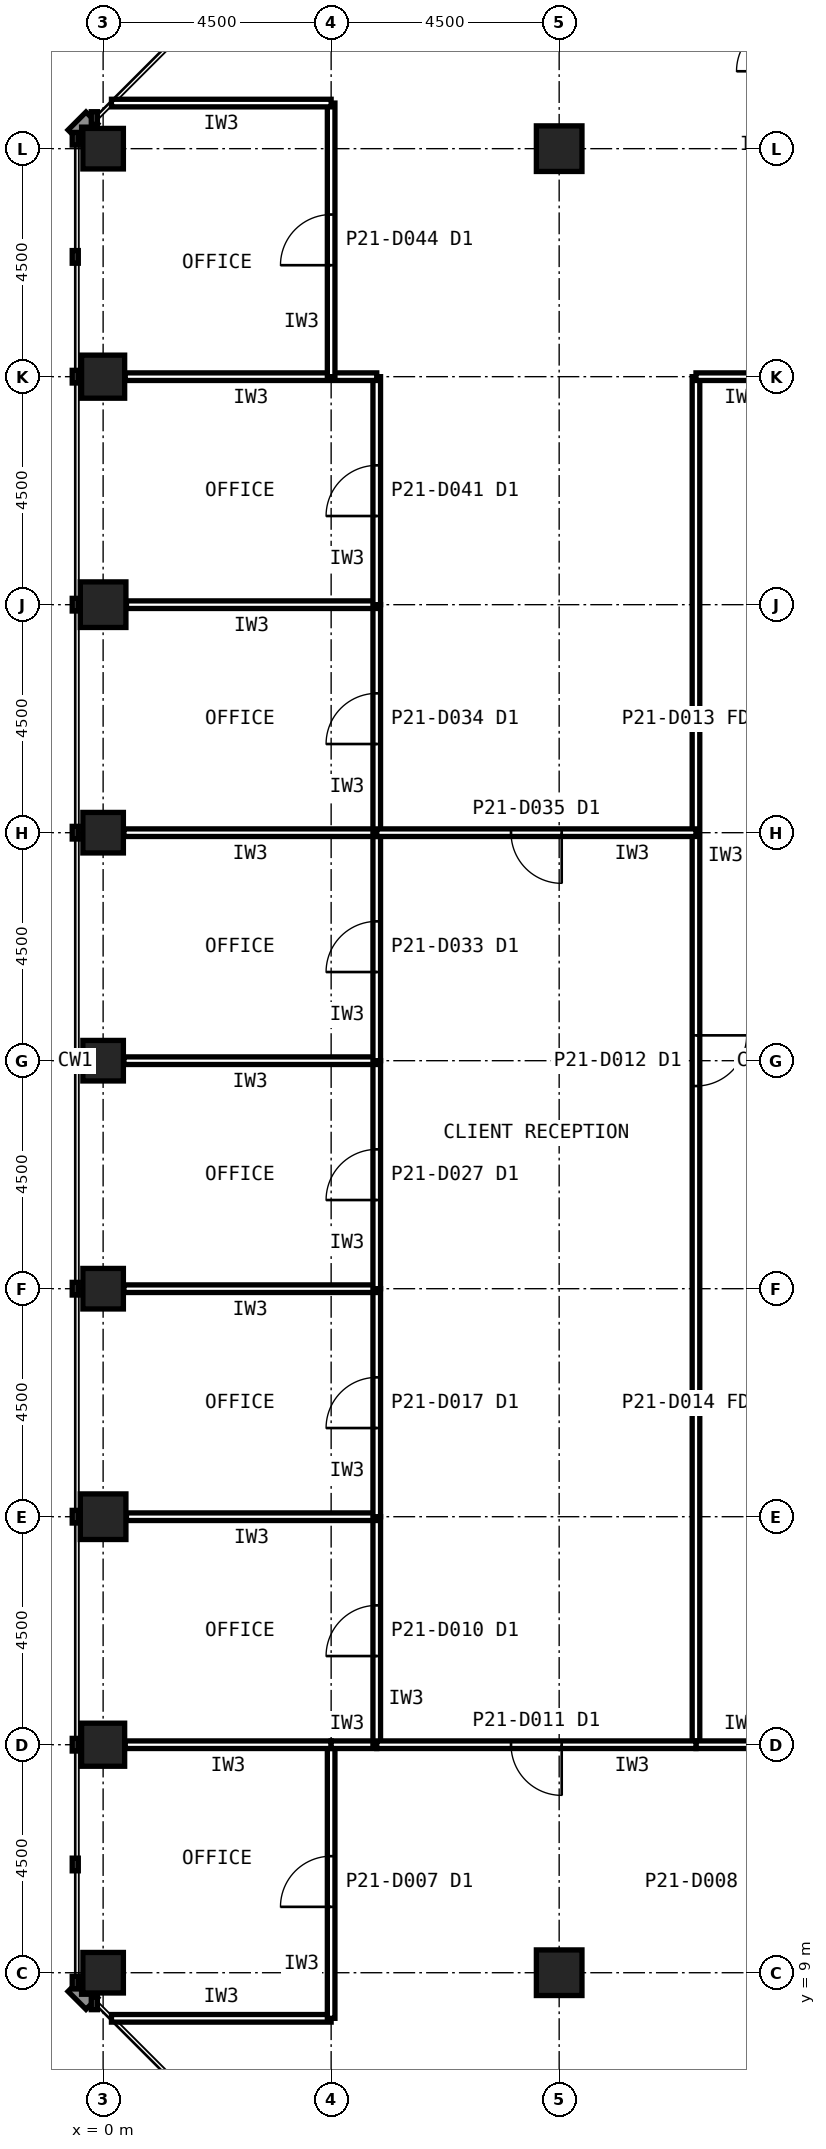
"""IFC4 building model, lengths in metres.
Left out: names, types, materials, properties, quantities, classifications, styles, units other than length and angle.
Written with IfcOpenShell. Run it as: python <this file> out.ifc"""

import sys

from ifc_helpers import new_model, si_unit, direction, frame, frame_2d, origin, origin_2d, place, context, subcontext, project, spatial, rectangle, hollow_rectangle, extrude, element, fill, save


model = new_model("IFC4")
c1 = context("Model", 3, precision=1e-05, world=origin(), true_north=direction((0.0, 1.0)))
c2 = subcontext(c1, "Body", "Model", "MODEL_VIEW")
j1 = project(units=[si_unit("LENGTHUNIT", "METRE"), si_unit("PLANEANGLEUNIT", "RADIAN")], contexts=[c1])
p1 = place(None, origin())
s1 = spatial("IfcSite", under=j1, at=p1, CompositionType="ELEMENT")
p2 = place(p1, origin())
s2 = spatial("IfcBuilding", under=s1, at=p2, CompositionType="ELEMENT")
p3 = place(p2, frame((0.0, 0.0, 87.8)))
s3 = spatial("IfcBuildingStorey", under=s2, at=p3, CompositionType="ELEMENT", Elevation=87.8)
p4 = place(p3, frame((0.0, 45.0, 0.0), z_axis=(0.0, 0.0, 1.0), x_axis=(1.0, 0.0, 0.0)))
e1 = element("IfcColumn", 1, at=p4, inside=s3, PredefinedType="COLUMN", context=c2, shape_type="SweptSolid", body=[
    extrude(hollow_rectangle(XDim=0.8, YDim=0.8, WallThickness=0.045, at=origin_2d()), origin(), (0.0, 0.0, 1.0), 4.2),
])
p5 = place(p3, frame((0.0, 40.5, 0.0), z_axis=(0.0, 0.0, 1.0), x_axis=(1.0, 0.0, 0.0)))
e2 = element("IfcColumn", 2, at=p5, inside=s3, PredefinedType="COLUMN", context=c2, shape_type="SweptSolid", body=[
    extrude(hollow_rectangle(XDim=0.85, YDim=0.85, WallThickness=0.05, at=origin_2d()), origin(), (0.0, 0.0, 1.0), 4.2),
])
p6 = place(p3, frame((0.0, 36.0, 0.0), z_axis=(0.0, 0.0, 1.0), x_axis=(1.0, 0.0, 0.0)))
e3 = element("IfcColumn", 3, at=p6, inside=s3, PredefinedType="COLUMN", context=c2, shape_type="SweptSolid", body=[
    extrude(hollow_rectangle(XDim=0.9, YDim=0.9, WallThickness=0.063, at=origin_2d()), origin(), (0.0, 0.0, 1.0), 4.2),
])
for number, where, z_axis, x_axis in (
    (4, (0.0, 31.5, 0.0), (0.0, 0.0, 1.0), (1.0, 0.0, 0.0)),
    (5, (0.0, 27.0, 0.0), (0.0, 0.0, 1.0), (1.0, 0.0, 0.0)),
    (6, (0.0, 22.5, 0.0), (0.0, 0.0, 1.0), (1.0, 0.0, 0.0)),
):
    element("IfcColumn", number, at=place(p3, frame(where, z_axis=z_axis, x_axis=x_axis)), inside=s3, PredefinedType="COLUMN", context=c2, shape_type="SweptSolid", body=[
        extrude(hollow_rectangle(XDim=0.8, YDim=0.8, WallThickness=0.045, at=origin_2d()), origin(), (0.0, 0.0, 1.0), 4.2),
    ])
p7 = place(p3, frame((0.0, 18.0, 0.0), z_axis=(0.0, 0.0, 1.0), x_axis=(1.0, 0.0, 0.0)))
e7 = element("IfcColumn", 7, at=p7, inside=s3, PredefinedType="COLUMN", context=c2, shape_type="SweptSolid", body=[
    extrude(hollow_rectangle(XDim=0.9, YDim=0.9, WallThickness=0.063, at=origin_2d()), origin(), (0.0, 0.0, 1.0), 4.2),
])
p8 = place(p3, frame((0.0, 13.5, 0.0), z_axis=(0.0, 0.0, 1.0), x_axis=(1.0, 0.0, 0.0)))
e8 = element("IfcColumn", 8, at=p8, inside=s3, PredefinedType="COLUMN", context=c2, shape_type="SweptSolid", body=[
    extrude(hollow_rectangle(XDim=0.85, YDim=0.85, WallThickness=0.05, at=origin_2d()), origin(), (0.0, 0.0, 1.0), 4.2),
])
p9 = place(p3, frame((0.0, 9.0, 0.0), z_axis=(0.0, 0.0, 1.0), x_axis=(1.0, 0.0, 0.0)))
e9 = element("IfcColumn", 9, at=p9, inside=s3, PredefinedType="COLUMN", context=c2, shape_type="SweptSolid", body=[
    extrude(hollow_rectangle(XDim=0.8, YDim=0.8, WallThickness=0.045, at=origin_2d()), origin(), (0.0, 0.0, 1.0), 4.2),
])
for number, where, z_axis, x_axis in (
    (10, (9.0, 9.0, 0.0), (0.0, 0.0, 1.0), (1.0, 0.0, 0.0)),
    (11, (9.0, 45.0, 0.0), (0.0, 0.0, 1.0), (1.0, 0.0, 0.0)),
):
    element("IfcColumn", number, at=place(p3, frame(where, z_axis=z_axis, x_axis=x_axis)), inside=s3, PredefinedType="COLUMN", context=c2, shape_type="SweptSolid", body=[
        extrude(hollow_rectangle(XDim=0.9, YDim=0.9, WallThickness=0.063, at=origin_2d()), origin(), (0.0, 0.0, 1.0), 4.2),
    ])
p10 = place(p3, frame((11.7, 40.5, 0.0), z_axis=(0.0, 0.0, 1.0), x_axis=(0.0, -1.0, 0.0)))
e12 = element("IfcWall", 12, at=p10, inside=s3, PredefinedType="PARTITIONING", context=c2, shape_type="SweptSolid", body=[
    extrude(rectangle(XDim=27.0, YDim=0.15, at=frame_2d((13.5, 0.0))), origin(), (0.0, 0.0, 1.0), 4.04),
])
p11 = place(p10, frame((13.0, 0.0, 0.0)))
e13 = element("IfcOpeningElement", 13, at=p11, cuts=e12, PredefinedType="OPENING", context=c2, shape_type="SweptSolid", body=[
    extrude(rectangle(XDim=1.0, YDim=2.1, at=frame_2d((0.5, 1.05))), frame((0.0, 0.085, 0.0), z_axis=(0.0, -1.0, 0.0), x_axis=(1.0, 0.0, 0.0)), (0.0, 0.0, 1.0), 0.17),
])
p12 = place(p3, frame((13.51, 40.5, 0.0), z_axis=(0.0, 0.0, 1.0), x_axis=(-1.0, 0.0, 0.0)))
e14 = element("IfcWall", 14, at=p12, inside=s3, PredefinedType="PARTITIONING", context=c2, shape_type="SweptSolid", body=[
    extrude(rectangle(XDim=1.81, YDim=0.15, at=frame_2d((0.905, 0.0))), origin(), (0.0, 0.0, 1.0), 3.189),
])
p13 = place(p3, frame((11.7, 13.5, 0.0), z_axis=(0.0, 0.0, 1.0), x_axis=(1.0, 0.0, 0.0)))
e15 = element("IfcWall", 15, at=p13, inside=s3, PredefinedType="PARTITIONING", context=c2, shape_type="SweptSolid", body=[
    extrude(rectangle(XDim=1.8, YDim=0.15, at=frame_2d((0.9, 0.0))), origin(), (0.0, 0.0, 1.0), 3.189),
])
p14 = place(p3, frame((0.165, 8.1, 0.0), z_axis=(0.0, 0.0, 1.0), x_axis=(1.0, 0.0, 0.0)))
e16 = element("IfcWall", 16, at=p14, inside=s3, PredefinedType="PARTITIONING", context=c2, shape_type="SweptSolid", body=[
    extrude(rectangle(XDim=4.335, YDim=0.15, at=frame_2d((2.168, 0.0))), origin(), (0.0, 0.0, 1.0), 4.04),
])
p15 = place(p3, frame((4.5, 8.1, 0.0), z_axis=(0.0, 0.0, 1.0), x_axis=(0.0, 1.0, 0.0)))
e17 = element("IfcWall", 17, at=p15, inside=s3, PredefinedType="PARTITIONING", context=c2, shape_type="SweptSolid", body=[
    extrude(rectangle(XDim=5.4, YDim=0.15, at=frame_2d((2.7, 0.0))), origin(), (0.0, 0.0, 1.0), 4.04),
])
p16 = place(p15, frame((2.2, 0.0, 0.0)))
e18 = element("IfcOpeningElement", 18, at=p16, cuts=e17, PredefinedType="OPENING", context=c2, shape_type="SweptSolid", body=[
    extrude(rectangle(XDim=1.0, YDim=2.1, at=frame_2d((0.5, 1.05))), frame((0.0, 0.085, 0.0), z_axis=(0.0, -1.0, 0.0), x_axis=(1.0, 0.0, 0.0)), (0.0, 0.0, 1.0), 0.17),
])
p17 = place(p3, frame((4.5, 13.5, 0.0), z_axis=(0.0, 0.0, 1.0), x_axis=(-1.0, 0.0, 0.0)))
e19 = element("IfcWall", 19, at=p17, inside=s3, PredefinedType="PARTITIONING", context=c2, shape_type="SweptSolid", body=[
    extrude(rectangle(XDim=4.065, YDim=0.15, at=frame_2d((2.032, 0.0))), origin(), (0.0, 0.0, 1.0), 3.189),
])
p18 = place(p3, frame((4.5, 13.5, 0.0), z_axis=(0.0, 0.0, 1.0), x_axis=(1.0, 0.0, 0.0)))
e20 = element("IfcWall", 20, at=p18, inside=s3, PredefinedType="PARTITIONING", context=c2, shape_type="SweptSolid", body=[
    extrude(rectangle(XDim=0.9, YDim=0.15, at=frame_2d((0.45, 0.0))), origin(), (0.0, 0.0, 1.0), 3.189),
])
p19 = place(p3, frame((5.4, 13.5, 0.0), z_axis=(0.0, 0.0, 1.0), x_axis=(0.0, 1.0, 0.0)))
e21 = element("IfcWall", 21, at=p19, inside=s3, PredefinedType="PARTITIONING", context=c2, shape_type="SweptSolid", body=[
    extrude(rectangle(XDim=4.5, YDim=0.15, at=frame_2d((2.25, 0.0))), origin(), (0.0, 0.0, 1.0), 4.04),
])
p20 = place(p19, frame((1.75, 0.0, 0.0)))
e22 = element("IfcOpeningElement", 22, at=p20, cuts=e21, PredefinedType="OPENING", context=c2, shape_type="SweptSolid", body=[
    extrude(rectangle(XDim=1.0, YDim=2.1, at=frame_2d((0.5, 1.05))), frame((0.0, 0.085, 0.0), z_axis=(0.0, -1.0, 0.0), x_axis=(1.0, 0.0, 0.0)), (0.0, 0.0, 1.0), 0.17),
])
p21 = place(p3, frame((5.4, 18.0, 0.0), z_axis=(0.0, 0.0, 1.0), x_axis=(-1.0, 0.0, 0.0)))
e23 = element("IfcWall", 23, at=p21, inside=s3, PredefinedType="PARTITIONING", context=c2, shape_type="SweptSolid", body=[
    extrude(rectangle(XDim=4.94, YDim=0.15, at=frame_2d((2.47, 0.0))), origin(), (0.0, 0.0, 1.0), 3.189),
])
p22 = place(p3, frame((5.4, 18.0, 0.0), z_axis=(0.0, 0.0, 1.0), x_axis=(0.0, 1.0, 0.0)))
e24 = element("IfcWall", 24, at=p22, inside=s3, PredefinedType="PARTITIONING", context=c2, shape_type="SweptSolid", body=[
    extrude(rectangle(XDim=4.5, YDim=0.15, at=frame_2d((2.25, 0.0))), origin(), (0.0, 0.0, 1.0), 4.04),
])
p23 = place(p22, frame((1.75, 0.0, 0.0)))
e25 = element("IfcOpeningElement", 25, at=p23, cuts=e24, PredefinedType="OPENING", context=c2, shape_type="SweptSolid", body=[
    extrude(rectangle(XDim=1.0, YDim=2.1, at=frame_2d((0.5, 1.05))), frame((0.0, 0.085, 0.0), z_axis=(0.0, -1.0, 0.0), x_axis=(1.0, 0.0, 0.0)), (0.0, 0.0, 1.0), 0.17),
])
p24 = place(p3, frame((5.4, 22.5, 0.0), z_axis=(0.0, 0.0, 1.0), x_axis=(-1.0, 0.0, 0.0)))
e26 = element("IfcWall", 26, at=p24, inside=s3, PredefinedType="PARTITIONING", context=c2, shape_type="SweptSolid", body=[
    extrude(rectangle(XDim=4.99, YDim=0.15, at=frame_2d((2.495, 0.0))), origin(), (0.0, 0.0, 1.0), 3.189),
])
p25 = place(p3, frame((5.4, 22.5, 0.0), z_axis=(0.0, 0.0, 1.0), x_axis=(0.0, 1.0, 0.0)))
e27 = element("IfcWall", 27, at=p25, inside=s3, PredefinedType="PARTITIONING", context=c2, shape_type="SweptSolid", body=[
    extrude(rectangle(XDim=4.5, YDim=0.15, at=frame_2d((2.25, 0.0))), origin(), (0.0, 0.0, 1.0), 4.04),
])
p26 = place(p25, frame((1.75, 0.0, 0.0)))
e28 = element("IfcOpeningElement", 28, at=p26, cuts=e27, PredefinedType="OPENING", context=c2, shape_type="SweptSolid", body=[
    extrude(rectangle(XDim=1.0, YDim=2.1, at=frame_2d((0.5, 1.05))), frame((0.0, 0.085, 0.0), z_axis=(0.0, -1.0, 0.0), x_axis=(1.0, 0.0, 0.0)), (0.0, 0.0, 1.0), 0.17),
])
p27 = place(p3, frame((5.4, 27.0, 0.0), z_axis=(0.0, 0.0, 1.0), x_axis=(-1.0, 0.0, 0.0)))
e29 = element("IfcWall", 29, at=p27, inside=s3, PredefinedType="PARTITIONING", context=c2, shape_type="SweptSolid", body=[
    extrude(rectangle(XDim=4.99, YDim=0.15, at=frame_2d((2.495, 0.0))), origin(), (0.0, 0.0, 1.0), 3.189),
])
p28 = place(p3, frame((5.4, 27.0, 0.0), z_axis=(0.0, 0.0, 1.0), x_axis=(0.0, 1.0, 0.0)))
e30 = element("IfcWall", 30, at=p28, inside=s3, PredefinedType="PARTITIONING", context=c2, shape_type="SweptSolid", body=[
    extrude(rectangle(XDim=4.5, YDim=0.15, at=frame_2d((2.25, 0.0))), origin(), (0.0, 0.0, 1.0), 4.04),
])
p29 = place(p28, frame((1.75, 0.0, 0.0)))
e31 = element("IfcOpeningElement", 31, at=p29, cuts=e30, PredefinedType="OPENING", context=c2, shape_type="SweptSolid", body=[
    extrude(rectangle(XDim=1.0, YDim=2.1, at=frame_2d((0.5, 1.05))), frame((0.0, 0.085, 0.0), z_axis=(0.0, -1.0, 0.0), x_axis=(1.0, 0.0, 0.0)), (0.0, 0.0, 1.0), 0.17),
])
p30 = place(p3, frame((5.4, 31.5, 0.0), z_axis=(0.0, 0.0, 1.0), x_axis=(-1.0, 0.0, 0.0)))
e32 = element("IfcWall", 32, at=p30, inside=s3, PredefinedType="PARTITIONING", context=c2, shape_type="SweptSolid", body=[
    extrude(rectangle(XDim=4.99, YDim=0.15, at=frame_2d((2.495, 0.0))), origin(), (0.0, 0.0, 1.0), 3.189),
])
p31 = place(p3, frame((5.4, 31.5, 0.0), z_axis=(0.0, 0.0, 1.0), x_axis=(0.0, 1.0, 0.0)))
e33 = element("IfcWall", 33, at=p31, inside=s3, PredefinedType="PARTITIONING", context=c2, shape_type="SweptSolid", body=[
    extrude(rectangle(XDim=4.5, YDim=0.15, at=frame_2d((2.25, 0.0))), origin(), (0.0, 0.0, 1.0), 4.04),
])
p32 = place(p31, frame((1.75, 0.0, 0.0)))
e34 = element("IfcOpeningElement", 34, at=p32, cuts=e33, PredefinedType="OPENING", context=c2, shape_type="SweptSolid", body=[
    extrude(rectangle(XDim=1.0, YDim=2.1, at=frame_2d((0.5, 1.05))), frame((0.0, 0.085, 0.0), z_axis=(0.0, -1.0, 0.0), x_axis=(1.0, 0.0, 0.0)), (0.0, 0.0, 1.0), 0.17),
])
p33 = place(p3, frame((5.4, 36.0, 0.0), z_axis=(0.0, 0.0, 1.0), x_axis=(-1.0, 0.0, 0.0)))
e35 = element("IfcWall", 35, at=p33, inside=s3, PredefinedType="PARTITIONING", context=c2, shape_type="SweptSolid", body=[
    extrude(rectangle(XDim=4.94, YDim=0.15, at=frame_2d((2.47, 0.0))), origin(), (0.0, 0.0, 1.0), 3.189),
])
p34 = place(p3, frame((5.4, 36.0, 0.0), z_axis=(0.0, 0.0, 1.0), x_axis=(0.0, 1.0, 0.0)))
e36 = element("IfcWall", 36, at=p34, inside=s3, PredefinedType="PARTITIONING", context=c2, shape_type="SweptSolid", body=[
    extrude(rectangle(XDim=4.5, YDim=0.15, at=frame_2d((2.25, 0.0))), origin(), (0.0, 0.0, 1.0), 4.04),
])
p35 = place(p34, frame((1.75, 0.0, 0.0)))
e37 = element("IfcOpeningElement", 37, at=p35, cuts=e36, PredefinedType="OPENING", context=c2, shape_type="SweptSolid", body=[
    extrude(rectangle(XDim=1.0, YDim=2.1, at=frame_2d((0.5, 1.05))), frame((0.0, 0.085, 0.0), z_axis=(0.0, -1.0, 0.0), x_axis=(1.0, 0.0, 0.0)), (0.0, 0.0, 1.0), 0.17),
])
p36 = place(p3, frame((5.4, 40.5, 0.0), z_axis=(0.0, 0.0, 1.0), x_axis=(-1.0, 0.0, 0.0)))
e38 = element("IfcWall", 38, at=p36, inside=s3, PredefinedType="PARTITIONING", context=c2, shape_type="SweptSolid", body=[
    extrude(rectangle(XDim=4.965, YDim=0.15, at=frame_2d((2.482, 0.0))), origin(), (0.0, 0.0, 1.0), 3.189),
])
p37 = place(p3, frame((4.5, 40.5, 0.0), z_axis=(0.0, 0.0, 1.0), x_axis=(0.0, 1.0, 0.0)))
e39 = element("IfcWall", 39, at=p37, inside=s3, PredefinedType="PARTITIONING", context=c2, shape_type="SweptSolid", body=[
    extrude(rectangle(XDim=5.4, YDim=0.15, at=frame_2d((2.7, 0.0))), origin(), (0.0, 0.0, 1.0), 4.04),
])
p38 = place(p37, frame((2.2, 0.0, 0.0)))
e40 = element("IfcOpeningElement", 40, at=p38, cuts=e39, PredefinedType="OPENING", context=c2, shape_type="SweptSolid", body=[
    extrude(rectangle(XDim=1.0, YDim=2.1, at=frame_2d((0.5, 1.05))), frame((0.0, 0.085, 0.0), z_axis=(0.0, -1.0, 0.0), x_axis=(1.0, 0.0, 0.0)), (0.0, 0.0, 1.0), 0.17),
])
p39 = place(p3, frame((4.5, 45.9, 0.0), z_axis=(0.0, 0.0, 1.0), x_axis=(-1.0, 0.0, 0.0)))
e41 = element("IfcWall", 41, at=p39, inside=s3, PredefinedType="PARTITIONING", context=c2, shape_type="SweptSolid", body=[
    extrude(rectangle(XDim=4.335, YDim=0.15, at=frame_2d((2.168, 0.0))), origin(), (0.0, 0.0, 1.0), 4.04),
])
p40 = place(p3, frame((11.7, 31.5, 0.0), z_axis=(0.0, 0.0, 1.0), x_axis=(-1.0, 0.0, 0.0)))
e42 = element("IfcWall", 42, at=p40, inside=s3, PredefinedType="PARTITIONING", context=c2, shape_type="SweptSolid", body=[
    extrude(rectangle(XDim=6.3, YDim=0.15, at=frame_2d((3.15, 0.0))), origin(), (0.0, 0.0, 1.0), 3.189),
])
p41 = place(p40, frame((2.65, 0.0, 0.0)))
e43 = element("IfcOpeningElement", 43, at=p41, cuts=e42, PredefinedType="OPENING", context=c2, shape_type="SweptSolid", body=[
    extrude(rectangle(XDim=1.0, YDim=2.1, at=frame_2d((0.5, 1.05))), frame((0.0, 0.085, 0.0), z_axis=(0.0, -1.0, 0.0), x_axis=(1.0, 0.0, 0.0)), (0.0, 0.0, 1.0), 0.17),
])
p42 = place(p3, frame((11.7, 13.5, 0.0), z_axis=(0.0, 0.0, 1.0), x_axis=(-1.0, 0.0, 0.0)))
e44 = element("IfcWall", 44, at=p42, inside=s3, PredefinedType="PARTITIONING", context=c2, shape_type="SweptSolid", body=[
    extrude(rectangle(XDim=6.3, YDim=0.15, at=frame_2d((3.15, 0.0))), origin(), (0.0, 0.0, 1.0), 3.189),
])
p43 = place(p42, frame((2.65, 0.0, 0.0)))
e45 = element("IfcOpeningElement", 45, at=p43, cuts=e44, PredefinedType="OPENING", context=c2, shape_type="SweptSolid", body=[
    extrude(rectangle(XDim=1.0, YDim=2.1, at=frame_2d((0.5, 1.05))), frame((0.0, 0.085, 0.0), z_axis=(0.0, -1.0, 0.0), x_axis=(1.0, 0.0, 0.0)), (0.0, 0.0, 1.0), 0.17),
])
p44 = place(p11, origin())
e46 = element("IfcDoor", 46, at=p44, inside=s3, OperationType="SINGLE_SWING_LEFT", PredefinedType="DOOR", context=c2, shape_type="SweptSolid", body=[
    extrude(rectangle(XDim=1.0, YDim=2.1, at=frame_2d((0.5, 1.05))), frame((0.0, 0.025, 0.0), z_axis=(0.0, -1.0, 0.0), x_axis=(1.0, 0.0, 0.0)), (0.0, 0.0, 1.0), 0.05),
])
fill(e13, e46)
p45 = place(p16, origin())
e47 = element("IfcDoor", 47, at=p45, inside=s3, OperationType="SINGLE_SWING_LEFT", PredefinedType="DOOR", context=c2, shape_type="SweptSolid", body=[
    extrude(rectangle(XDim=1.0, YDim=2.1, at=frame_2d((0.5, 1.05))), frame((0.0, 0.025, 0.0), z_axis=(0.0, -1.0, 0.0), x_axis=(1.0, 0.0, 0.0)), (0.0, 0.0, 1.0), 0.05),
])
fill(e18, e47)
p46 = place(p20, origin())
e48 = element("IfcDoor", 48, at=p46, inside=s3, OperationType="SINGLE_SWING_LEFT", PredefinedType="DOOR", context=c2, shape_type="SweptSolid", body=[
    extrude(rectangle(XDim=1.0, YDim=2.1, at=frame_2d((0.5, 1.05))), frame((0.0, 0.025, 0.0), z_axis=(0.0, -1.0, 0.0), x_axis=(1.0, 0.0, 0.0)), (0.0, 0.0, 1.0), 0.05),
])
fill(e22, e48)
p47 = place(p23, origin())
e49 = element("IfcDoor", 49, at=p47, inside=s3, OperationType="SINGLE_SWING_LEFT", PredefinedType="DOOR", context=c2, shape_type="SweptSolid", body=[
    extrude(rectangle(XDim=1.0, YDim=2.1, at=frame_2d((0.5, 1.05))), frame((0.0, 0.025, 0.0), z_axis=(0.0, -1.0, 0.0), x_axis=(1.0, 0.0, 0.0)), (0.0, 0.0, 1.0), 0.05),
])
fill(e25, e49)
p48 = place(p26, origin())
e50 = element("IfcDoor", 50, at=p48, inside=s3, OperationType="SINGLE_SWING_LEFT", PredefinedType="DOOR", context=c2, shape_type="SweptSolid", body=[
    extrude(rectangle(XDim=1.0, YDim=2.1, at=frame_2d((0.5, 1.05))), frame((0.0, 0.025, 0.0), z_axis=(0.0, -1.0, 0.0), x_axis=(1.0, 0.0, 0.0)), (0.0, 0.0, 1.0), 0.05),
])
fill(e28, e50)
p49 = place(p29, origin())
e51 = element("IfcDoor", 51, at=p49, inside=s3, OperationType="SINGLE_SWING_LEFT", PredefinedType="DOOR", context=c2, shape_type="SweptSolid", body=[
    extrude(rectangle(XDim=1.0, YDim=2.1, at=frame_2d((0.5, 1.05))), frame((0.0, 0.025, 0.0), z_axis=(0.0, -1.0, 0.0), x_axis=(1.0, 0.0, 0.0)), (0.0, 0.0, 1.0), 0.05),
])
fill(e31, e51)
p50 = place(p32, origin())
e52 = element("IfcDoor", 52, at=p50, inside=s3, OperationType="SINGLE_SWING_LEFT", PredefinedType="DOOR", context=c2, shape_type="SweptSolid", body=[
    extrude(rectangle(XDim=1.0, YDim=2.1, at=frame_2d((0.5, 1.05))), frame((0.0, 0.025, 0.0), z_axis=(0.0, -1.0, 0.0), x_axis=(1.0, 0.0, 0.0)), (0.0, 0.0, 1.0), 0.05),
])
fill(e34, e52)
p51 = place(p35, origin())
e53 = element("IfcDoor", 53, at=p51, inside=s3, OperationType="SINGLE_SWING_LEFT", PredefinedType="DOOR", context=c2, shape_type="SweptSolid", body=[
    extrude(rectangle(XDim=1.0, YDim=2.1, at=frame_2d((0.5, 1.05))), frame((0.0, 0.025, 0.0), z_axis=(0.0, -1.0, 0.0), x_axis=(1.0, 0.0, 0.0)), (0.0, 0.0, 1.0), 0.05),
])
fill(e37, e53)
p52 = place(p38, origin())
e54 = element("IfcDoor", 54, at=p52, inside=s3, OperationType="SINGLE_SWING_LEFT", PredefinedType="DOOR", context=c2, shape_type="SweptSolid", body=[
    extrude(rectangle(XDim=1.0, YDim=2.1, at=frame_2d((0.5, 1.05))), frame((0.0, 0.025, 0.0), z_axis=(0.0, -1.0, 0.0), x_axis=(1.0, 0.0, 0.0)), (0.0, 0.0, 1.0), 0.05),
])
fill(e40, e54)
p53 = place(p41, origin())
e55 = element("IfcDoor", 55, at=p53, inside=s3, OperationType="SINGLE_SWING_LEFT", PredefinedType="DOOR", context=c2, shape_type="SweptSolid", body=[
    extrude(rectangle(XDim=1.0, YDim=2.1, at=frame_2d((0.5, 1.05))), frame((0.0, 0.025, 0.0), z_axis=(0.0, -1.0, 0.0), x_axis=(1.0, 0.0, 0.0)), (0.0, 0.0, 1.0), 0.05),
])
fill(e43, e55)
p54 = place(p43, origin())
e56 = element("IfcDoor", 56, at=p54, inside=s3, OperationType="SINGLE_SWING_LEFT", PredefinedType="DOOR", context=c2, shape_type="SweptSolid", body=[
    extrude(rectangle(XDim=1.0, YDim=2.1, at=frame_2d((0.5, 1.05))), frame((0.0, 0.025, 0.0), z_axis=(0.0, -1.0, 0.0), x_axis=(1.0, 0.0, 0.0)), (0.0, 0.0, 1.0), 0.05),
])
fill(e45, e56)
save(model, sys.argv[1])
